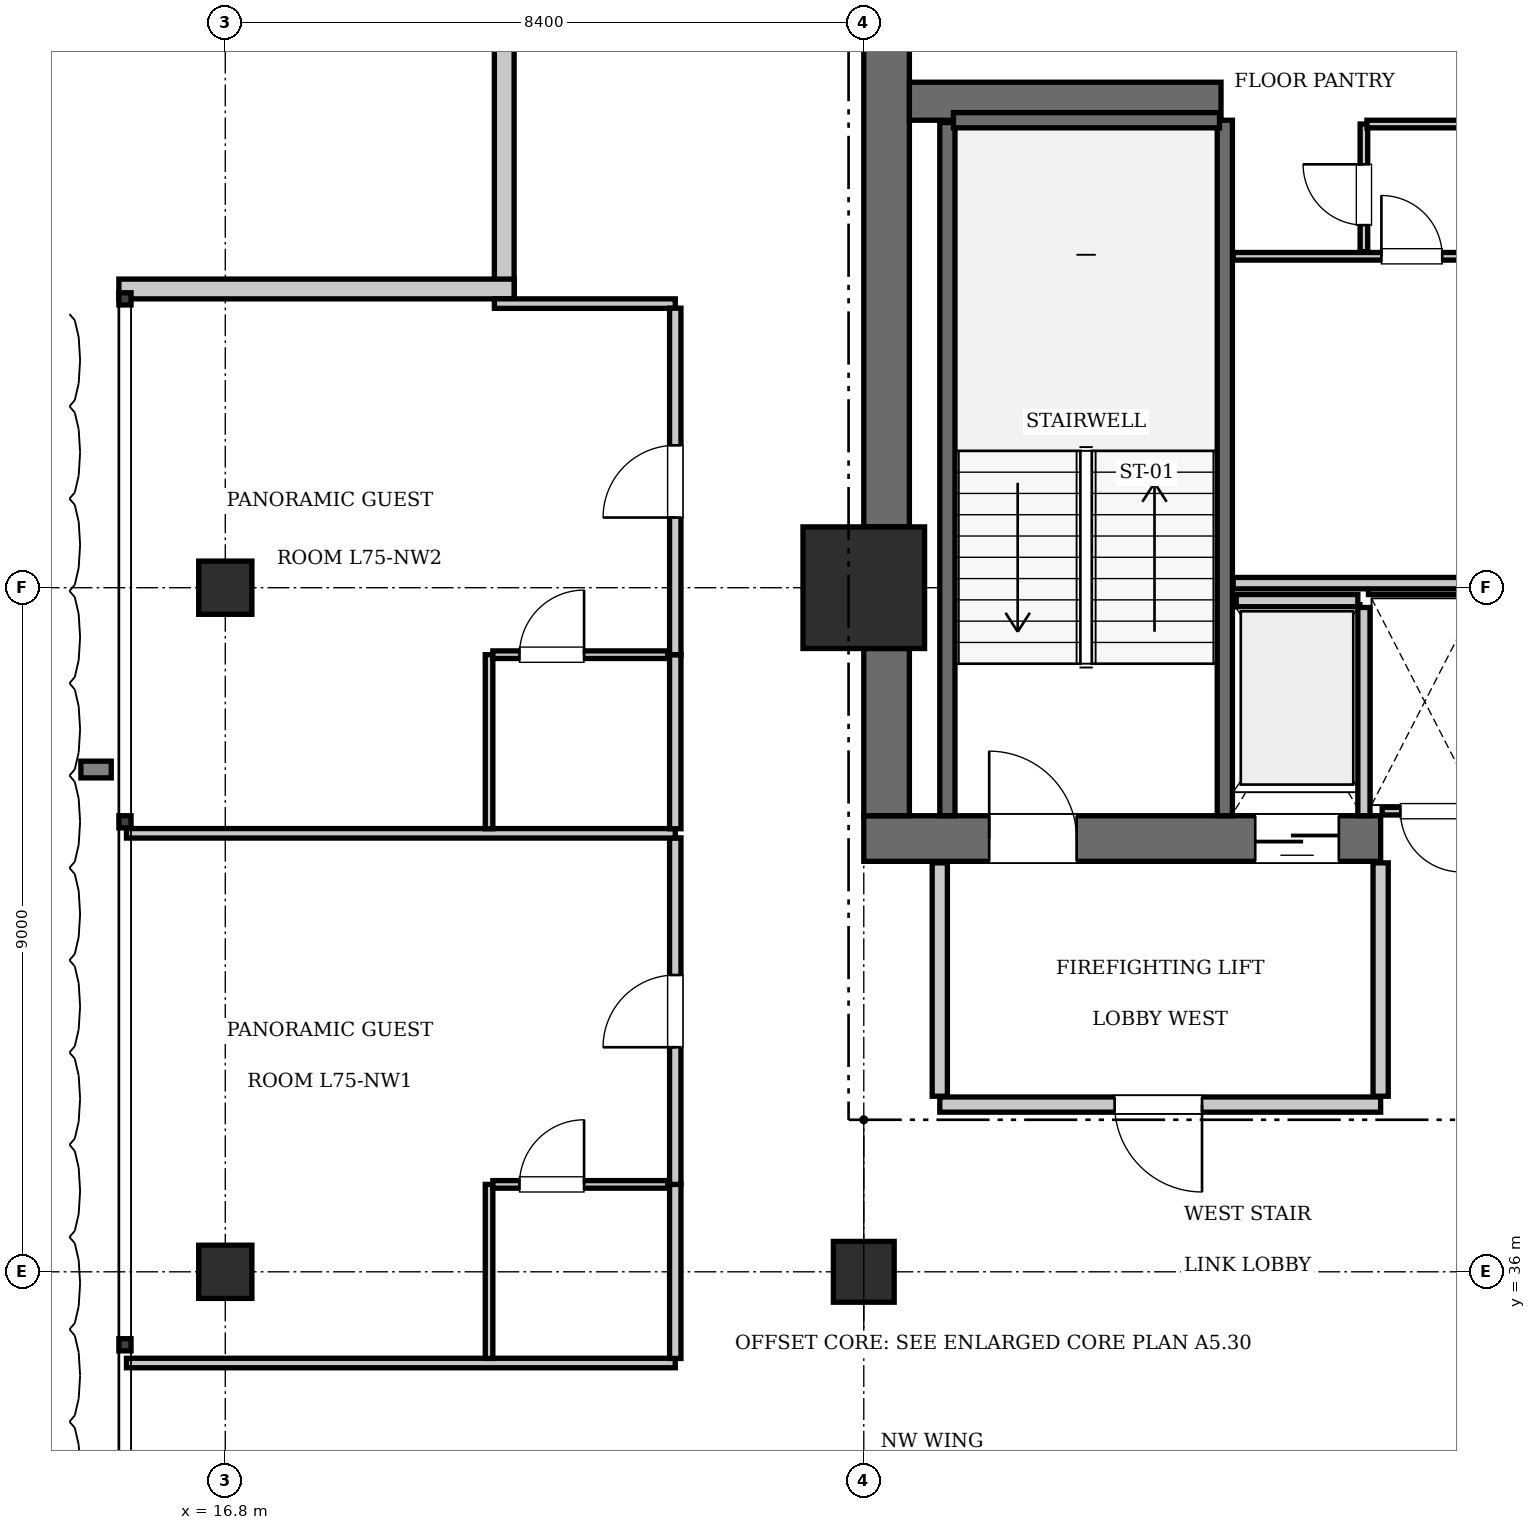
"""IFC4 building model, lengths in metres.
Left out: names, types, materials, properties, quantities, classifications, styles, units other than length and angle.
Written with IfcOpenShell. Run it as: python <this file> out.ifc"""

import sys

from ifc_helpers import new_model, si_unit, direction, frame, frame_2d, origin, origin_2d, place, context, subcontext, project, spatial, rectangle, extrude, element, fill, save


model = new_model("IFC4")
c1 = context("Model", 3, precision=1e-05, world=origin(), true_north=direction((0.0, 1.0)))
c2 = subcontext(c1, "Body", "Model", "MODEL_VIEW")
j1 = project(units=[si_unit("LENGTHUNIT", "METRE"), si_unit("PLANEANGLEUNIT", "RADIAN")], contexts=[c1])
p1 = place(None, origin())
s1 = spatial("IfcSite", under=j1, at=p1, CompositionType="ELEMENT")
p2 = place(p1, origin())
s2 = spatial("IfcBuilding", under=s1, at=p2, CompositionType="ELEMENT")
p3 = place(p2, frame((0.0, 0.0, 304.85)))
s3 = spatial("IfcBuildingStorey", under=s2, at=p3, CompositionType="ELEMENT", Elevation=304.85)
p4 = place(p3, frame((25.2, 45.0, 0.0), z_axis=(0.0, 0.0, 1.0), x_axis=(1.0, 0.0, 0.0)))
e1 = element("IfcColumn", 1, at=p4, inside=s3, PredefinedType="COLUMN", context=c2, shape_type="SweptSolid", body=[
    extrude(rectangle(XDim=1.6, YDim=1.6, at=origin_2d()), origin(), (0.0, 0.0, 1.0), 3.85),
])
p5 = place(p3, frame((25.2, 41.7, 0.0), z_axis=(0.0, 0.0, 1.0), x_axis=(1.0, 0.0, 0.0)))
e2 = element("IfcWall", 2, at=p5, inside=s3, PredefinedType="SHEAR", context=c2, shape_type="SweptSolid", body=[
    extrude(rectangle(XDim=6.8, YDim=0.6, at=frame_2d((3.4, 0.0))), origin(), (0.0, 0.0, 1.0), 3.85),
])
p6 = place(p5, frame((1.65, 0.0, 0.0)))
e3 = element("IfcOpeningElement", 3, at=p6, cuts=e2, PredefinedType="OPENING", context=c2, shape_type="SweptSolid", body=[
    extrude(rectangle(XDim=1.15, YDim=2.15, at=frame_2d((0.575, 1.075))), frame((0.0, 0.31, 0.0), z_axis=(0.0, -1.0, 0.0), x_axis=(1.0, 0.0, 0.0)), (0.0, 0.0, 1.0), 0.62),
])
p7 = place(p5, frame((5.15, 0.0, 0.0)))
e4 = element("IfcOpeningElement", 4, at=p7, cuts=e2, PredefinedType="OPENING", context=c2, shape_type="SweptSolid", body=[
    extrude(rectangle(XDim=1.1, YDim=2.2, at=frame_2d((0.55, 1.1))), frame((0.0, 0.31, 0.0), z_axis=(0.0, -1.0, 0.0), x_axis=(1.0, 0.0, 0.0)), (0.0, 0.0, 1.0), 0.62),
])
p8 = place(p3, frame((25.5, 42.0, 0.0), z_axis=(0.0, 0.0, 1.0), x_axis=(0.0, 1.0, 0.0)))
e5 = element("IfcWall", 5, at=p8, inside=s3, PredefinedType="SHEAR", context=c2, shape_type="SweptSolid", body=[
    extrude(rectangle(XDim=2.2, YDim=0.6, at=frame_2d((1.1, 0.0))), origin(), (0.0, 0.0, 1.0), 3.85),
])
p9 = place(p3, frame((25.5, 45.8, 0.0), z_axis=(0.0, 0.0, 1.0), x_axis=(0.0, 1.0, 0.0)))
e6 = element("IfcWall", 6, at=p9, inside=s3, PredefinedType="SHEAR", context=c2, shape_type="SweptSolid", body=[
    extrude(rectangle(XDim=7.6, YDim=0.6, at=frame_2d((3.8, 0.0))), origin(), (0.0, 0.0, 1.0), 3.85),
])
p10 = place(p3, frame((25.8, 51.4, 0.0), z_axis=(0.0, 0.0, 1.0), x_axis=(1.0, 0.0, 0.0)))
e7 = element("IfcWall", 7, at=p10, inside=s3, PredefinedType="SHEAR", context=c2, shape_type="SweptSolid", body=[
    extrude(rectangle(XDim=4.1, YDim=0.5, at=frame_2d((2.05, 0.0))), origin(), (0.0, 0.0, 1.0), 3.85),
])
p11 = place(p3, frame((25.2, 36.0, 0.0), z_axis=(0.0, 0.0, 1.0), x_axis=(1.0, 0.0, 0.0)))
e8 = element("IfcColumn", 8, at=p11, inside=s3, PredefinedType="COLUMN", context=c2, shape_type="SweptSolid", body=[
    extrude(rectangle(XDim=0.8, YDim=0.8, at=origin_2d()), origin(), (0.0, 0.0, 1.0), 3.85),
])
for number, where, z_axis, x_axis in (
    (9, (16.8, 36.0, 0.0), (0.0, 0.0, 1.0), (1.0, 0.0, 0.0)),
    (10, (16.8, 45.0, 0.0), (0.0, 0.0, 1.0), (1.0, 0.0, 0.0)),
):
    element("IfcColumn", number, at=place(p3, frame(where, z_axis=z_axis, x_axis=x_axis)), inside=s3, PredefinedType="COLUMN", context=c2, shape_type="SweptSolid", body=[
        extrude(rectangle(XDim=0.7, YDim=0.7, at=origin_2d()), origin(), (0.0, 0.0, 1.0), 3.85),
    ])
p12 = place(p3, frame((29.95, 42.0, 0.0), z_axis=(0.0, 0.0, 1.0), x_axis=(0.0, 1.0, 0.0)))
e11 = element("IfcWall", 11, at=p12, inside=s3, PredefinedType="SOLIDWALL", context=c2, shape_type="SweptSolid", body=[
    extrude(rectangle(XDim=9.15, YDim=0.2, at=frame_2d((4.575, 0.0))), origin(), (0.0, 0.0, 1.0), 3.61),
])
p13 = place(p3, frame((26.3, 42.0, 0.0), z_axis=(0.0, 0.0, 1.0), x_axis=(0.0, 1.0, 0.0)))
e12 = element("IfcWall", 12, at=p13, inside=s3, PredefinedType="SOLIDWALL", context=c2, shape_type="SweptSolid", body=[
    extrude(rectangle(XDim=9.12, YDim=0.2, at=frame_2d((4.56, 0.0))), origin(), (0.0, 0.0, 1.0), 3.61),
])
p14 = place(p3, frame((26.38, 51.15, 0.0), z_axis=(0.0, 0.0, 1.0), x_axis=(1.0, 0.0, 0.0)))
e13 = element("IfcWall", 13, at=p14, inside=s3, PredefinedType="SOLIDWALL", context=c2, shape_type="SweptSolid", body=[
    extrude(rectangle(XDim=3.5, YDim=0.2, at=frame_2d((1.75, 0.0))), origin(), (0.0, 0.0, 1.0), 3.61),
])
p15 = place(p3, frame((30.1, 44.83, 0.0), z_axis=(0.0, 0.0, 1.0), x_axis=(1.0, 0.0, 0.0)))
e14 = element("IfcWall", 14, at=p15, inside=s3, PredefinedType="SOLIDWALL", context=c2, shape_type="SweptSolid", body=[
    extrude(rectangle(XDim=1.6, YDim=0.16, at=frame_2d((0.8, 0.0))), origin(), (0.0, 0.0, 1.0), 3.61),
])
p16 = place(p3, frame((31.78, 42.0, 0.0), z_axis=(0.0, 0.0, 1.0), x_axis=(0.0, 1.0, 0.0)))
e15 = element("IfcWall", 15, at=p16, inside=s3, PredefinedType="SOLIDWALL", context=c2, shape_type="SweptSolid", body=[
    extrude(rectangle(XDim=2.74, YDim=0.16, at=frame_2d((1.37, 0.0))), origin(), (0.0, 0.0, 1.0), 3.61),
])
p17 = place(p3, frame((20.47, 48.8, 0.0), z_axis=(0.0, 0.0, 1.0), x_axis=(0.0, 1.0, 0.0)))
e16 = element("IfcWall", 16, at=p17, inside=s3, PredefinedType="SOLIDWALL", context=c2, shape_type="SweptSolid", body=[
    extrude(rectangle(XDim=5.2, YDim=0.26, at=frame_2d((2.6, 0.0))), origin(), (0.0, 0.0, 1.0), 3.61),
])
p18 = place(p3, frame((15.4, 48.93, 0.0), z_axis=(0.0, 0.0, 1.0), x_axis=(1.0, 0.0, 0.0)))
e17 = element("IfcWall", 17, at=p18, inside=s3, PredefinedType="SOLIDWALL", context=c2, shape_type="SweptSolid", body=[
    extrude(rectangle(XDim=5.2, YDim=0.26, at=frame_2d((2.6, 0.0))), origin(), (0.0, 0.0, 1.0), 3.61),
])
p19 = place(p3, frame((26.2, 38.2, 0.0), z_axis=(0.0, 0.0, 1.0), x_axis=(1.0, 0.0, 0.0)))
e18 = element("IfcWall", 18, at=p19, inside=s3, PredefinedType="PARTITIONING", context=c2, shape_type="SweptSolid", body=[
    extrude(rectangle(XDim=5.8, YDim=0.2, at=frame_2d((2.9, 0.0))), origin(), (0.0, 0.0, 1.0), 3.61),
])
p20 = place(p19, frame((2.3, 0.0, 0.0)))
e19 = element("IfcOpeningElement", 19, at=p20, cuts=e18, PredefinedType="OPENING", context=c2, shape_type="SweptSolid", body=[
    extrude(rectangle(XDim=1.15, YDim=2.15, at=frame_2d((0.575, 1.075))), frame((0.0, 0.11, 0.0), z_axis=(0.0, -1.0, 0.0), x_axis=(1.0, 0.0, 0.0)), (0.0, 0.0, 1.0), 0.22),
])
for number, where, z_axis, x_axis in (
    (20, (26.2, 38.31, 0.0), (0.0, 0.0, 1.0), (0.0, 1.0, 0.0)),
    (21, (32.0, 38.31, 0.0), (0.0, 0.0, 1.0), (0.0, 1.0, 0.0)),
):
    element("IfcWall", number, at=place(p3, frame(where, z_axis=z_axis, x_axis=x_axis)), inside=s3, PredefinedType="PARTITIONING", context=c2, shape_type="SweptSolid", body=[
        extrude(rectangle(XDim=3.07, YDim=0.2, at=frame_2d((1.535, 0.0))), origin(), (0.0, 0.0, 1.0), 3.61),
    ])
p21 = place(p3, frame((32.02, 42.06, 0.0), z_axis=(0.0, 0.0, 1.0), x_axis=(1.0, 0.0, 0.0)))
e22 = element("IfcWall", 22, at=p21, inside=s3, PredefinedType="PARTITIONING", context=c2, shape_type="SweptSolid", body=[
    extrude(rectangle(XDim=1.32, YDim=0.1, at=frame_2d((0.66, 0.0))), origin(), (0.0, 0.0, 1.0), 3.61),
])
p22 = place(p21, frame((0.24, 0.0, 0.0)))
e23 = element("IfcOpeningElement", 23, at=p22, cuts=e22, PredefinedType="OPENING", context=c2, shape_type="SweptSolid", body=[
    extrude(rectangle(XDim=0.8, YDim=2.05, at=frame_2d((0.4, 1.025))), frame((0.0, 0.06, 0.0), z_axis=(0.0, -1.0, 0.0), x_axis=(1.0, 0.0, 0.0)), (0.0, 0.0, 1.0), 0.12),
])
p23 = place(p3, frame((31.84, 44.96, 0.0), z_axis=(0.0, 0.0, 1.0), x_axis=(1.0, 0.0, 0.0)))
e24 = element("IfcWall", 24, at=p23, inside=s3, PredefinedType="PARTITIONING", context=c2, shape_type="SweptSolid", body=[
    extrude(rectangle(XDim=1.48, YDim=0.1, at=frame_2d((0.74, 0.0))), origin(), (0.0, 0.0, 1.0), 3.61),
])
p24 = place(p3, frame((30.06, 45.06, 0.0), z_axis=(0.0, 0.0, 1.0), x_axis=(1.0, 0.0, 0.0)))
e25 = element("IfcWall", 25, at=p24, inside=s3, PredefinedType="PARTITIONING", context=c2, shape_type="SweptSolid", body=[
    extrude(rectangle(XDim=3.18, YDim=0.15, at=frame_2d((1.59, 0.0))), origin(), (0.0, 0.0, 1.0), 3.61),
])
p25 = place(p3, frame((30.06, 49.36, 0.0), z_axis=(0.0, 0.0, 1.0), x_axis=(1.0, 0.0, 0.0)))
e26 = element("IfcWall", 26, at=p25, inside=s3, PredefinedType="PARTITIONING", context=c2, shape_type="SweptSolid", body=[
    extrude(rectangle(XDim=3.18, YDim=0.1, at=frame_2d((1.59, 0.0))), origin(), (0.0, 0.0, 1.0), 3.61),
])
p26 = place(p25, frame((1.95, 0.0, 0.0)))
e27 = element("IfcOpeningElement", 27, at=p26, cuts=e26, PredefinedType="OPENING", context=c2, shape_type="SweptSolid", body=[
    extrude(rectangle(XDim=0.8, YDim=2.05, at=frame_2d((0.4, 1.025))), frame((0.0, 0.06, 0.0), z_axis=(0.0, -1.0, 0.0), x_axis=(1.0, 0.0, 0.0)), (0.0, 0.0, 1.0), 0.12),
])
p27 = place(p3, frame((31.78, 49.42, 0.0), z_axis=(0.0, 0.0, 1.0), x_axis=(0.0, 1.0, 0.0)))
e28 = element("IfcWall", 28, at=p27, inside=s3, PredefinedType="PARTITIONING", context=c2, shape_type="SweptSolid", body=[
    extrude(rectangle(XDim=1.68, YDim=0.1, at=frame_2d((0.84, 0.0))), origin(), (0.0, 0.0, 1.0), 3.61),
])
p28 = place(p27, frame((0.35, 0.0, 0.0)))
e29 = element("IfcOpeningElement", 29, at=p28, cuts=e28, PredefinedType="OPENING", context=c2, shape_type="SweptSolid", body=[
    extrude(rectangle(XDim=0.8, YDim=2.05, at=frame_2d((0.4, 1.025))), frame((0.0, 0.06, 0.0), z_axis=(0.0, -1.0, 0.0), x_axis=(1.0, 0.0, 0.0)), (0.0, 0.0, 1.0), 0.12),
])
p29 = place(p3, frame((31.82, 51.1, 0.0), z_axis=(0.0, 0.0, 1.0), x_axis=(1.0, 0.0, 0.0)))
e30 = element("IfcWall", 30, at=p29, inside=s3, PredefinedType="PARTITIONING", context=c2, shape_type="SweptSolid", body=[
    extrude(rectangle(XDim=1.42, YDim=0.1, at=frame_2d((0.71, 0.0))), origin(), (0.0, 0.0, 1.0), 3.61),
])
p30 = place(p3, frame((15.5, 34.8, 0.0), z_axis=(0.0, 0.0, 1.0), x_axis=(1.0, 0.0, 0.0)))
e31 = element("IfcWall", 31, at=p30, inside=s3, PredefinedType="PARTITIONING", context=c2, shape_type="SweptSolid", body=[
    extrude(rectangle(XDim=7.22, YDim=0.125, at=frame_2d((3.61, 0.0))), origin(), (0.0, 0.0, 1.0), 3.61),
])
p31 = place(p3, frame((20.34, 48.738, 0.0), z_axis=(0.0, 0.0, 1.0), x_axis=(1.0, 0.0, 0.0)))
e32 = element("IfcWall", 32, at=p31, inside=s3, PredefinedType="PARTITIONING", context=c2, shape_type="SweptSolid", body=[
    extrude(rectangle(XDim=2.38, YDim=0.125, at=frame_2d((1.19, 0.0))), origin(), (0.0, 0.0, 1.0), 3.61),
])
p32 = place(p3, frame((22.72, 34.86, 0.0), z_axis=(0.0, 0.0, 1.0), x_axis=(0.0, 1.0, 0.0)))
e33 = element("IfcWall", 33, at=p32, inside=s3, PredefinedType="PARTITIONING", context=c2, shape_type="SweptSolid", body=[
    extrude(rectangle(XDim=2.29, YDim=0.15, at=frame_2d((1.145, 0.0))), origin(), (0.0, 0.0, 1.0), 3.61),
])
p33 = place(p3, frame((22.72, 37.15, 0.0), z_axis=(0.0, 0.0, 1.0), x_axis=(0.0, 1.0, 0.0)))
e34 = element("IfcWall", 34, at=p33, inside=s3, PredefinedType="PARTITIONING", context=c2, shape_type="SweptSolid", body=[
    extrude(rectangle(XDim=4.559, YDim=0.15, at=frame_2d((2.279, 0.0))), origin(), (0.0, 0.0, 1.0), 3.61),
])
p34 = place(p33, frame((1.804, 0.0, 0.0)))
e35 = element("IfcOpeningElement", 35, at=p34, cuts=e34, PredefinedType="OPENING", context=c2, shape_type="SweptSolid", body=[
    extrude(rectangle(XDim=0.95, YDim=2.15, at=frame_2d((0.475, 1.075))), frame((0.0, 0.085, 0.0), z_axis=(0.0, -1.0, 0.0), x_axis=(1.0, 0.0, 0.0)), (0.0, 0.0, 1.0), 0.17),
])
p35 = place(p3, frame((20.27, 34.86, 0.0), z_axis=(0.0, 0.0, 1.0), x_axis=(0.0, 1.0, 0.0)))
e36 = element("IfcWall", 36, at=p35, inside=s3, PredefinedType="PARTITIONING", context=c2, shape_type="SweptSolid", body=[
    extrude(rectangle(XDim=2.29, YDim=0.1, at=frame_2d((1.145, 0.0))), origin(), (0.0, 0.0, 1.0), 3.61),
])
p36 = place(p3, frame((20.32, 37.15, 0.0), z_axis=(0.0, 0.0, 1.0), x_axis=(1.0, 0.0, 0.0)))
e37 = element("IfcWall", 37, at=p36, inside=s3, PredefinedType="PARTITIONING", context=c2, shape_type="SweptSolid", body=[
    extrude(rectangle(XDim=2.3, YDim=0.1, at=frame_2d((1.15, 0.0))), origin(), (0.0, 0.0, 1.0), 3.61),
])
p37 = place(p36, frame((0.35, 0.0, 0.0)))
e38 = element("IfcOpeningElement", 38, at=p37, cuts=e37, PredefinedType="OPENING", context=c2, shape_type="SweptSolid", body=[
    extrude(rectangle(XDim=0.85, YDim=2.1, at=frame_2d((0.425, 1.05))), frame((0.0, 0.06, 0.0), z_axis=(0.0, -1.0, 0.0), x_axis=(1.0, 0.0, 0.0)), (0.0, 0.0, 1.0), 0.12),
])
p38 = place(p3, frame((15.5, 41.769, 0.0), z_axis=(0.0, 0.0, 1.0), x_axis=(1.0, 0.0, 0.0)))
e39 = element("IfcWall", 39, at=p38, inside=s3, PredefinedType="PARTITIONING", context=c2, shape_type="SweptSolid", body=[
    extrude(rectangle(XDim=7.22, YDim=0.125, at=frame_2d((3.61, 0.0))), origin(), (0.0, 0.0, 1.0), 3.61),
])
p39 = place(p3, frame((22.72, 41.829, 0.0), z_axis=(0.0, 0.0, 1.0), x_axis=(0.0, 1.0, 0.0)))
e40 = element("IfcWall", 40, at=p39, inside=s3, PredefinedType="PARTITIONING", context=c2, shape_type="SweptSolid", body=[
    extrude(rectangle(XDim=2.29, YDim=0.15, at=frame_2d((1.145, 0.0))), origin(), (0.0, 0.0, 1.0), 3.61),
])
p40 = place(p3, frame((22.72, 44.119, 0.0), z_axis=(0.0, 0.0, 1.0), x_axis=(0.0, 1.0, 0.0)))
e41 = element("IfcWall", 41, at=p40, inside=s3, PredefinedType="PARTITIONING", context=c2, shape_type="SweptSolid", body=[
    extrude(rectangle(XDim=4.559, YDim=0.15, at=frame_2d((2.279, 0.0))), origin(), (0.0, 0.0, 1.0), 3.61),
])
p41 = place(p40, frame((1.804, 0.0, 0.0)))
e42 = element("IfcOpeningElement", 42, at=p41, cuts=e41, PredefinedType="OPENING", context=c2, shape_type="SweptSolid", body=[
    extrude(rectangle(XDim=0.95, YDim=2.15, at=frame_2d((0.475, 1.075))), frame((0.0, 0.085, 0.0), z_axis=(0.0, -1.0, 0.0), x_axis=(1.0, 0.0, 0.0)), (0.0, 0.0, 1.0), 0.17),
])
p42 = place(p3, frame((20.27, 41.829, 0.0), z_axis=(0.0, 0.0, 1.0), x_axis=(0.0, 1.0, 0.0)))
e43 = element("IfcWall", 43, at=p42, inside=s3, PredefinedType="PARTITIONING", context=c2, shape_type="SweptSolid", body=[
    extrude(rectangle(XDim=2.29, YDim=0.1, at=frame_2d((1.145, 0.0))), origin(), (0.0, 0.0, 1.0), 3.61),
])
p43 = place(p3, frame((20.32, 44.119, 0.0), z_axis=(0.0, 0.0, 1.0), x_axis=(1.0, 0.0, 0.0)))
e44 = element("IfcWall", 44, at=p43, inside=s3, PredefinedType="PARTITIONING", context=c2, shape_type="SweptSolid", body=[
    extrude(rectangle(XDim=2.3, YDim=0.1, at=frame_2d((1.15, 0.0))), origin(), (0.0, 0.0, 1.0), 3.61),
])
p44 = place(p43, frame((0.35, 0.0, 0.0)))
e45 = element("IfcOpeningElement", 45, at=p44, cuts=e44, PredefinedType="OPENING", context=c2, shape_type="SweptSolid", body=[
    extrude(rectangle(XDim=0.85, YDim=2.1, at=frame_2d((0.425, 1.05))), frame((0.0, 0.06, 0.0), z_axis=(0.0, -1.0, 0.0), x_axis=(1.0, 0.0, 0.0)), (0.0, 0.0, 1.0), 0.12),
])
p45 = place(p6, origin())
e46 = element("IfcDoor", 46, at=p45, inside=s3, OperationType="SINGLE_SWING_LEFT", PredefinedType="DOOR", context=c2, shape_type="SweptSolid", body=[
    extrude(rectangle(XDim=1.15, YDim=2.15, at=frame_2d((0.575, 1.075))), frame((0.0, 0.025, 0.0), z_axis=(0.0, -1.0, 0.0), x_axis=(1.0, 0.0, 0.0)), (0.0, 0.0, 1.0), 0.05),
])
fill(e3, e46)
p46 = place(p7, frame((1.1, 0.0, 0.0), z_axis=(0.0, 0.0, 1.0), x_axis=(-1.0, 0.0, 0.0)))
e47 = element("IfcDoor", 47, at=p46, inside=s3, OperationType="SLIDING_TO_LEFT", PredefinedType="DOOR", context=c2, shape_type="SweptSolid", body=[
    extrude(rectangle(XDim=1.1, YDim=2.2, at=frame_2d((0.55, 1.1))), frame((0.0, 0.025, 0.0), z_axis=(0.0, -1.0, 0.0), x_axis=(1.0, 0.0, 0.0)), (0.0, 0.0, 1.0), 0.05),
])
fill(e4, e47)
p47 = place(p20, frame((1.15, 0.0, 0.0), z_axis=(0.0, 0.0, 1.0), x_axis=(-1.0, 0.0, 0.0)))
e48 = element("IfcDoor", 48, at=p47, inside=s3, OperationType="SINGLE_SWING_LEFT", PredefinedType="DOOR", context=c2, shape_type="SweptSolid", body=[
    extrude(rectangle(XDim=1.15, YDim=2.15, at=frame_2d((0.575, 1.075))), frame((0.0, 0.025, 0.0), z_axis=(0.0, -1.0, 0.0), x_axis=(1.0, 0.0, 0.0)), (0.0, 0.0, 1.0), 0.05),
])
fill(e19, e48)
p48 = place(p22, frame((0.8, 0.0, 0.0), z_axis=(0.0, 0.0, 1.0), x_axis=(-1.0, 0.0, 0.0)))
e49 = element("IfcDoor", 49, at=p48, inside=s3, OperationType="SINGLE_SWING_LEFT", PredefinedType="DOOR", context=c2, shape_type="SweptSolid", body=[
    extrude(rectangle(XDim=0.8, YDim=2.05, at=frame_2d((0.4, 1.025))), frame((0.0, 0.025, 0.0), z_axis=(0.0, -1.0, 0.0), x_axis=(1.0, 0.0, 0.0)), (0.0, 0.0, 1.0), 0.05),
])
fill(e23, e49)
p49 = place(p26, origin())
e50 = element("IfcDoor", 50, at=p49, inside=s3, OperationType="SINGLE_SWING_LEFT", PredefinedType="DOOR", context=c2, shape_type="SweptSolid", body=[
    extrude(rectangle(XDim=0.8, YDim=2.05, at=frame_2d((0.4, 1.025))), frame((0.0, 0.025, 0.0), z_axis=(0.0, -1.0, 0.0), x_axis=(1.0, 0.0, 0.0)), (0.0, 0.0, 1.0), 0.05),
])
fill(e27, e50)
p50 = place(p28, origin())
e51 = element("IfcDoor", 51, at=p50, inside=s3, OperationType="SINGLE_SWING_RIGHT", PredefinedType="DOOR", context=c2, shape_type="SweptSolid", body=[
    extrude(rectangle(XDim=0.8, YDim=2.05, at=frame_2d((0.4, 1.025))), frame((0.0, 0.025, 0.0), z_axis=(0.0, -1.0, 0.0), x_axis=(1.0, 0.0, 0.0)), (0.0, 0.0, 1.0), 0.05),
])
fill(e29, e51)
p51 = place(p37, origin())
e52 = element("IfcDoor", 52, at=p51, inside=s3, OperationType="SINGLE_SWING_RIGHT", PredefinedType="DOOR", context=c2, shape_type="SweptSolid", body=[
    extrude(rectangle(XDim=0.85, YDim=2.1, at=frame_2d((0.425, 1.05))), frame((0.0, 0.025, 0.0), z_axis=(0.0, -1.0, 0.0), x_axis=(1.0, 0.0, 0.0)), (0.0, 0.0, 1.0), 0.05),
])
fill(e38, e52)
p52 = place(p34, origin())
e53 = element("IfcDoor", 53, at=p52, inside=s3, OperationType="SINGLE_SWING_LEFT", PredefinedType="DOOR", context=c2, shape_type="SweptSolid", body=[
    extrude(rectangle(XDim=0.95, YDim=2.15, at=frame_2d((0.475, 1.075))), frame((0.0, 0.025, 0.0), z_axis=(0.0, -1.0, 0.0), x_axis=(1.0, 0.0, 0.0)), (0.0, 0.0, 1.0), 0.05),
])
fill(e35, e53)
p53 = place(p44, origin())
e54 = element("IfcDoor", 54, at=p53, inside=s3, OperationType="SINGLE_SWING_RIGHT", PredefinedType="DOOR", context=c2, shape_type="SweptSolid", body=[
    extrude(rectangle(XDim=0.85, YDim=2.1, at=frame_2d((0.425, 1.05))), frame((0.0, 0.025, 0.0), z_axis=(0.0, -1.0, 0.0), x_axis=(1.0, 0.0, 0.0)), (0.0, 0.0, 1.0), 0.05),
])
fill(e45, e54)
p54 = place(p41, origin())
e55 = element("IfcDoor", 55, at=p54, inside=s3, OperationType="SINGLE_SWING_LEFT", PredefinedType="DOOR", context=c2, shape_type="SweptSolid", body=[
    extrude(rectangle(XDim=0.95, YDim=2.15, at=frame_2d((0.475, 1.075))), frame((0.0, 0.025, 0.0), z_axis=(0.0, -1.0, 0.0), x_axis=(1.0, 0.0, 0.0)), (0.0, 0.0, 1.0), 0.05),
])
fill(e42, e55)
save(model, sys.argv[1])
